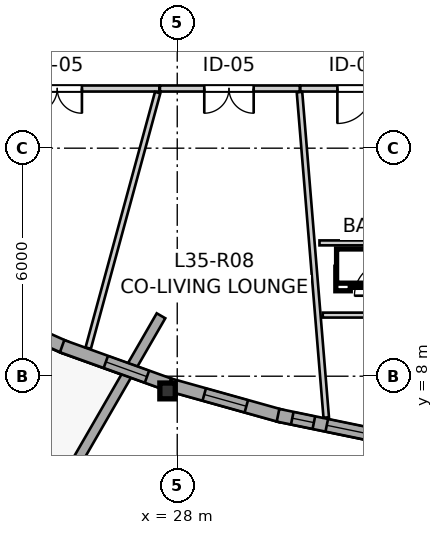
"""IFC4 building model, lengths in metres.
Left out: names, types, materials, properties, quantities, classifications, styles, units other than length and angle.
Written with IfcOpenShell. Run it as: python <this file> out.ifc"""

import sys

from ifc_helpers import new_model, si_unit, direction, frame, frame_2d, origin, origin_2d, place, context, subcontext, project, spatial, rectangle, i_section, extrude, source, transform, mapped, element, fill, save


model = new_model("IFC4")
c1 = context("Model", 3, precision=1e-05, world=origin(), true_north=direction((0.0, 1.0)))
c2 = subcontext(c1, "Body", "Model", "MODEL_VIEW")
j1 = project(units=[si_unit("LENGTHUNIT", "METRE"), si_unit("PLANEANGLEUNIT", "RADIAN")], contexts=[c1])
p1 = place(None, origin())
s1 = spatial("IfcSite", under=j1, at=p1, CompositionType="ELEMENT")
p2 = place(p1, origin())
s2 = spatial("IfcBuilding", under=s1, at=p2, CompositionType="ELEMENT")
p3 = place(p2, frame((0.0, 0.0, 118.4)))
s3 = spatial("IfcBuildingStorey", under=s2, at=p3, CompositionType="ELEMENT", Elevation=118.4)
m1 = source(origin(), c2, "Body", "SweptSolid", [
    extrude(i_section(OverallWidth=0.406, OverallDepth=0.416, WebThickness=0.027, FlangeThickness=0.044, FilletRadius=0.015, at=origin_2d()), origin(), (0.0, 0.0, 1.0), 2.95),
])
p4 = place(p3, frame((27.746, 7.613, 0.0), z_axis=(0.0, 0.0, 1.0), x_axis=(1.0, 0.0, 0.0)))
e1 = element("IfcColumn", 1, at=p4, inside=s3, PredefinedType="PILASTER", context=c2, shape_type="MappedRepresentation", body=[
    mapped(m1, transform((0.0, 0.0, 0.0), x_axis=(1.0, 0.0, 0.0), y_axis=(0.0, 1.0, 0.0), z_axis=(0.0, 0.0, 1.0), scale=1.0)),
])
p5 = place(p3, frame((17.318, -8.173, 0.0), z_axis=(0.0, 0.0, 1.0), x_axis=(0.499993784865, 0.866028992064, 0.0)))
e2 = element("IfcWall", 2, at=p5, inside=s3, PredefinedType="PARAPET", context=c2, shape_type="SweptSolid", body=[
    extrude(rectangle(XDim=20.51, YDim=0.26, at=frame_2d((10.255, 0.0))), origin(), (0.0, 0.0, 1.0), 0.55),
])
p6 = place(p3, frame((22.544, 9.875, 0.0), z_axis=(0.0, 0.0, 1.0), x_axis=(0.913404185574, -0.407053797153, 0.0)))
e3 = element("IfcWall", 3, at=p6, inside=s3, PredefinedType="SOLIDWALL", context=c2, shape_type="SweptSolid", body=[
    extrude(rectangle(XDim=2.746, YDim=0.34, at=frame_2d((1.373, 0.0))), origin(), (0.0, 0.0, 1.0), 2.48),
])
p7 = place(p6, frame((0.493, 0.0, 0.82)))
e4 = element("IfcOpeningElement", 4, at=p7, cuts=e3, PredefinedType="OPENING", context=c2, shape_type="SweptSolid", body=[
    extrude(rectangle(XDim=1.75, YDim=1.3, at=frame_2d((0.875, 0.65))), frame((0.0, 0.18, 0.0), z_axis=(0.0, -1.0, 0.0), x_axis=(1.0, 0.0, 0.0)), (0.0, 0.0, 1.0), 0.36),
])
p8 = place(p3, frame((24.971, 8.79, 0.0), z_axis=(0.0, 0.0, 1.0), x_axis=(0.941086086789, -0.338167084814, 0.0)))
e5 = element("IfcWall", 5, at=p8, inside=s3, PredefinedType="SOLIDWALL", context=c2, shape_type="SweptSolid", body=[
    extrude(rectangle(XDim=2.99, YDim=0.34, at=frame_2d((1.495, 0.0))), origin(), (0.0, 0.0, 1.0), 2.48),
])
p9 = place(p8, frame((1.222, 0.0, 0.82)))
e6 = element("IfcOpeningElement", 6, at=p9, cuts=e5, PredefinedType="OPENING", context=c2, shape_type="SweptSolid", body=[
    extrude(rectangle(XDim=1.15, YDim=1.2, at=frame_2d((0.575, 0.6))), frame((0.0, 0.18, 0.0), z_axis=(0.0, -1.0, 0.0), x_axis=(1.0, 0.0, 0.0)), (0.0, 0.0, 1.0), 0.36),
])
p10 = place(p3, frame((27.811, 7.771, 0.0), z_axis=(0.0, 0.0, 1.0), x_axis=(0.963039905189, -0.269358758934, 0.0)))
e7 = element("IfcWall", 7, at=p10, inside=s3, PredefinedType="SOLIDWALL", context=c2, shape_type="SweptSolid", body=[
    extrude(rectangle(XDim=3.039, YDim=0.34, at=frame_2d((1.52, 0.0))), origin(), (0.0, 0.0, 1.0), 2.48),
])
p11 = place(p10, frame((0.935, 0.0, 0.82)))
e8 = element("IfcOpeningElement", 8, at=p11, cuts=e7, PredefinedType="OPENING", context=c2, shape_type="SweptSolid", body=[
    extrude(rectangle(XDim=1.15, YDim=1.2, at=frame_2d((0.575, 0.6))), frame((0.0, 0.18, 0.0), z_axis=(0.0, -1.0, 0.0), x_axis=(1.0, 0.0, 0.0)), (0.0, 0.0, 1.0), 0.36),
])
p12 = place(p3, frame((30.652, 6.973, 0.0), z_axis=(0.0, 0.0, 1.0), x_axis=(0.979418300652, -0.201841007595, 0.0)))
e9 = element("IfcWall", 9, at=p12, inside=s3, PredefinedType="SOLIDWALL", context=c2, shape_type="SweptSolid", body=[
    extrude(rectangle(XDim=2.893, YDim=0.34, at=frame_2d((1.447, 0.0))), origin(), (0.0, 0.0, 1.0), 2.48),
])
p13 = place(p12, frame((0.383, 0.0, 0.82)))
e10 = element("IfcOpeningElement", 10, at=p13, cuts=e9, PredefinedType="OPENING", context=c2, shape_type="SweptSolid", body=[
    extrude(rectangle(XDim=0.58, YDim=1.35, at=frame_2d((0.29, 0.675))), frame((0.0, 0.18, 0.0), z_axis=(0.0, -1.0, 0.0), x_axis=(1.0, 0.0, 0.0)), (0.0, 0.0, 1.0), 0.36),
])
p14 = place(p12, frame((1.31, 0.0, 0.82)))
e11 = element("IfcOpeningElement", 11, at=p14, cuts=e9, PredefinedType="OPENING", context=c2, shape_type="SweptSolid", body=[
    extrude(rectangle(XDim=1.15, YDim=1.2, at=frame_2d((0.575, 0.6))), frame((0.0, 0.18, 0.0), z_axis=(0.0, -1.0, 0.0), x_axis=(1.0, 0.0, 0.0)), (0.0, 0.0, 1.0), 0.36),
])
p15 = place(p3, frame((27.53, 15.57, 0.0), z_axis=(0.0, 0.0, 1.0), x_axis=(-1.0, 0.0, 0.0)))
e12 = element("IfcWall", 12, at=p15, inside=s3, PredefinedType="PARTITIONING", context=c2, shape_type="SweptSolid", body=[
    extrude(rectangle(XDim=5.36, YDim=0.16, at=frame_2d((2.68, 0.0))), origin(), (0.0, 0.0, 1.0), 2.95),
])
p16 = place(p15, frame((2.038, 0.0, 0.0)))
e13 = element("IfcOpeningElement", 13, at=p16, cuts=e12, PredefinedType="OPENING", context=c2, shape_type="SweptSolid", body=[
    extrude(rectangle(XDim=1.3, YDim=2.1, at=frame_2d((0.65, 1.05))), frame((0.0, 0.09, 0.0), z_axis=(0.0, -1.0, 0.0), x_axis=(1.0, 0.0, 0.0)), (0.0, 0.0, 1.0), 0.18),
])
p17 = place(p3, frame((31.224, 15.57, 0.0), z_axis=(0.0, 0.0, 1.0), x_axis=(-1.0, 0.0, 0.0)))
e14 = element("IfcWall", 14, at=p17, inside=s3, PredefinedType="PARTITIONING", context=c2, shape_type="SweptSolid", body=[
    extrude(rectangle(XDim=3.679, YDim=0.16, at=frame_2d((1.84, 0.0))), origin(), (0.0, 0.0, 1.0), 2.95),
])
p18 = place(p17, frame((1.212, 0.0, 0.0)))
e15 = element("IfcOpeningElement", 15, at=p18, cuts=e14, PredefinedType="OPENING", context=c2, shape_type="SweptSolid", body=[
    extrude(rectangle(XDim=1.3, YDim=2.1, at=frame_2d((0.65, 1.05))), frame((0.0, 0.09, 0.0), z_axis=(0.0, -1.0, 0.0), x_axis=(1.0, 0.0, 0.0)), (0.0, 0.0, 1.0), 0.18),
])
p19 = place(p3, frame((34.108, 15.57, 0.0), z_axis=(0.0, 0.0, 1.0), x_axis=(-1.0, 0.0, 0.0)))
e16 = element("IfcWall", 16, at=p19, inside=s3, PredefinedType="PARTITIONING", context=c2, shape_type="SweptSolid", body=[
    extrude(rectangle(XDim=2.869, YDim=0.16, at=frame_2d((1.435, 0.0))), origin(), (0.0, 0.0, 1.0), 2.95),
])
p20 = place(p19, frame((0.974, 0.0, 0.0)))
e17 = element("IfcOpeningElement", 17, at=p20, cuts=e16, PredefinedType="OPENING", context=c2, shape_type="SweptSolid", body=[
    extrude(rectangle(XDim=0.92, YDim=2.1, at=frame_2d((0.46, 1.05))), frame((0.0, 0.09, 0.0), z_axis=(0.0, -1.0, 0.0), x_axis=(1.0, 0.0, 0.0)), (0.0, 0.0, 1.0), 0.18),
])
p21 = place(p3, frame((31.217, 15.476, 0.0), z_axis=(0.0, 0.0, 1.0), x_axis=(0.081928316893, -0.996638224679, 0.0)))
e18 = element("IfcWall", 18, at=p21, inside=s3, PredefinedType="PARTITIONING", context=c2, shape_type="SweptSolid", body=[
    extrude(rectangle(XDim=8.591, YDim=0.145, at=frame_2d((4.295, 0.0))), origin(), (0.0, 0.0, 1.0), 2.95),
])
p22 = place(p3, frame((25.657, 8.739, 0.0), z_axis=(0.0, 0.0, 1.0), x_axis=(0.26231095786, 0.964983399539, 0.0)))
e19 = element("IfcWall", 19, at=p22, inside=s3, PredefinedType="PARTITIONING", context=c2, shape_type="SweptSolid", body=[
    extrude(rectangle(XDim=6.968, YDim=0.145, at=frame_2d((3.484, 0.0))), origin(), (0.0, 0.0, 1.0), 2.95),
])
p23 = place(p3, frame((31.743, 11.508, 0.0), z_axis=(0.0, 0.0, 1.0), x_axis=(1.0, 0.0, 0.0)))
e20 = element("IfcWall", 20, at=p23, inside=s3, PredefinedType="PARTITIONING", context=c2, shape_type="SweptSolid", body=[
    extrude(rectangle(XDim=1.727, YDim=0.13, at=frame_2d((0.864, 0.0))), origin(), (0.0, 0.0, 1.0), 2.95),
])
p24 = place(p3, frame((31.829, 9.608, 0.0), z_axis=(0.0, 0.0, 1.0), x_axis=(1.0, 0.0, 0.0)))
e21 = element("IfcWall", 21, at=p24, inside=s3, PredefinedType="PARTITIONING", context=c2, shape_type="SweptSolid", body=[
    extrude(rectangle(XDim=1.641, YDim=0.13, at=frame_2d((0.82, 0.0))), origin(), (0.0, 0.0, 1.0), 2.558),
])
m2 = source(origin(), c2, "Body", "SweptSolid", [
    extrude(rectangle(XDim=1.15, YDim=1.2, at=frame_2d((0.575, 0.6))), frame((0.0, 0.03, 0.0), z_axis=(0.0, -1.0, 0.0), x_axis=(1.0, 0.0, 0.0)), (0.0, 0.0, 1.0), 0.06),
])
p25 = place(p9, origin())
e22 = element("IfcWindow", 22, at=p25, inside=s3, PartitioningType="SINGLE_PANEL", PredefinedType="WINDOW", context=c2, shape_type="MappedRepresentation", body=[
    mapped(m2, transform((0.0, 0.0, 0.0), x_axis=(1.0, 0.0, 0.0), y_axis=(0.0, 1.0, 0.0), z_axis=(0.0, 0.0, 1.0), scale=1.0)),
])
fill(e6, e22)
p26 = place(p11, origin())
e23 = element("IfcWindow", 23, at=p26, inside=s3, PartitioningType="SINGLE_PANEL", PredefinedType="WINDOW", context=c2, shape_type="MappedRepresentation", body=[
    mapped(m2, transform((0.0, 0.0, 0.0), x_axis=(1.0, 0.0, 0.0), y_axis=(0.0, 1.0, 0.0), z_axis=(0.0, 0.0, 1.0), scale=1.0)),
])
fill(e8, e23)
m3 = source(origin(), c2, "Body", "SweptSolid", [
    extrude(rectangle(XDim=0.58, YDim=1.35, at=frame_2d((0.29, 0.675))), frame((0.0, 0.03, 0.0), z_axis=(0.0, -1.0, 0.0), x_axis=(1.0, 0.0, 0.0)), (0.0, 0.0, 1.0), 0.06),
])
p27 = place(p13, origin())
e24 = element("IfcWindow", 24, at=p27, inside=s3, PartitioningType="SINGLE_PANEL", PredefinedType="WINDOW", context=c2, shape_type="MappedRepresentation", body=[
    mapped(m3, transform((0.0, 0.0, 0.0), x_axis=(1.0, 0.0, 0.0), y_axis=(0.0, 1.0, 0.0), z_axis=(0.0, 0.0, 1.0), scale=1.0)),
])
fill(e10, e24)
p28 = place(p14, origin())
e25 = element("IfcWindow", 25, at=p28, inside=s3, PartitioningType="SINGLE_PANEL", PredefinedType="WINDOW", context=c2, shape_type="MappedRepresentation", body=[
    mapped(m2, transform((0.0, 0.0, 0.0), x_axis=(1.0, 0.0, 0.0), y_axis=(0.0, 1.0, 0.0), z_axis=(0.0, 0.0, 1.0), scale=1.0)),
])
fill(e11, e25)
m4 = source(origin(), c2, "Body", "SweptSolid", [
    extrude(rectangle(XDim=1.3, YDim=2.1, at=frame_2d((0.65, 1.05))), frame((0.0, 0.025, 0.0), z_axis=(0.0, -1.0, 0.0), x_axis=(1.0, 0.0, 0.0)), (0.0, 0.0, 1.0), 0.05),
])
p29 = place(p16, origin())
e26 = element("IfcDoor", 26, at=p29, inside=s3, OperationType="DOUBLE_DOOR_SINGLE_SWING", PredefinedType="DOOR", context=c2, shape_type="MappedRepresentation", body=[
    mapped(m4, transform((0.0, 0.0, 0.0), x_axis=(1.0, 0.0, 0.0), y_axis=(0.0, 1.0, 0.0), z_axis=(0.0, 0.0, 1.0), scale=1.0)),
])
fill(e13, e26)
p30 = place(p18, origin())
e27 = element("IfcDoor", 27, at=p30, inside=s3, OperationType="DOUBLE_DOOR_SINGLE_SWING", PredefinedType="DOOR", context=c2, shape_type="MappedRepresentation", body=[
    mapped(m4, transform((0.0, 0.0, 0.0), x_axis=(1.0, 0.0, 0.0), y_axis=(0.0, 1.0, 0.0), z_axis=(0.0, 0.0, 1.0), scale=1.0)),
])
fill(e15, e27)
m5 = source(origin(), c2, "Body", "SweptSolid", [
    extrude(rectangle(XDim=0.92, YDim=2.1, at=frame_2d((0.46, 1.05))), frame((0.0, 0.025, 0.0), z_axis=(0.0, -1.0, 0.0), x_axis=(1.0, 0.0, 0.0)), (0.0, 0.0, 1.0), 0.05),
])
p31 = place(p20, origin())
e28 = element("IfcDoor", 28, at=p31, inside=s3, OperationType="SINGLE_SWING_RIGHT", PredefinedType="DOOR", context=c2, shape_type="MappedRepresentation", body=[
    mapped(m5, transform((0.0, 0.0, 0.0), x_axis=(1.0, 0.0, 0.0), y_axis=(0.0, 1.0, 0.0), z_axis=(0.0, 0.0, 1.0), scale=1.0)),
])
fill(e17, e28)
save(model, sys.argv[1])
